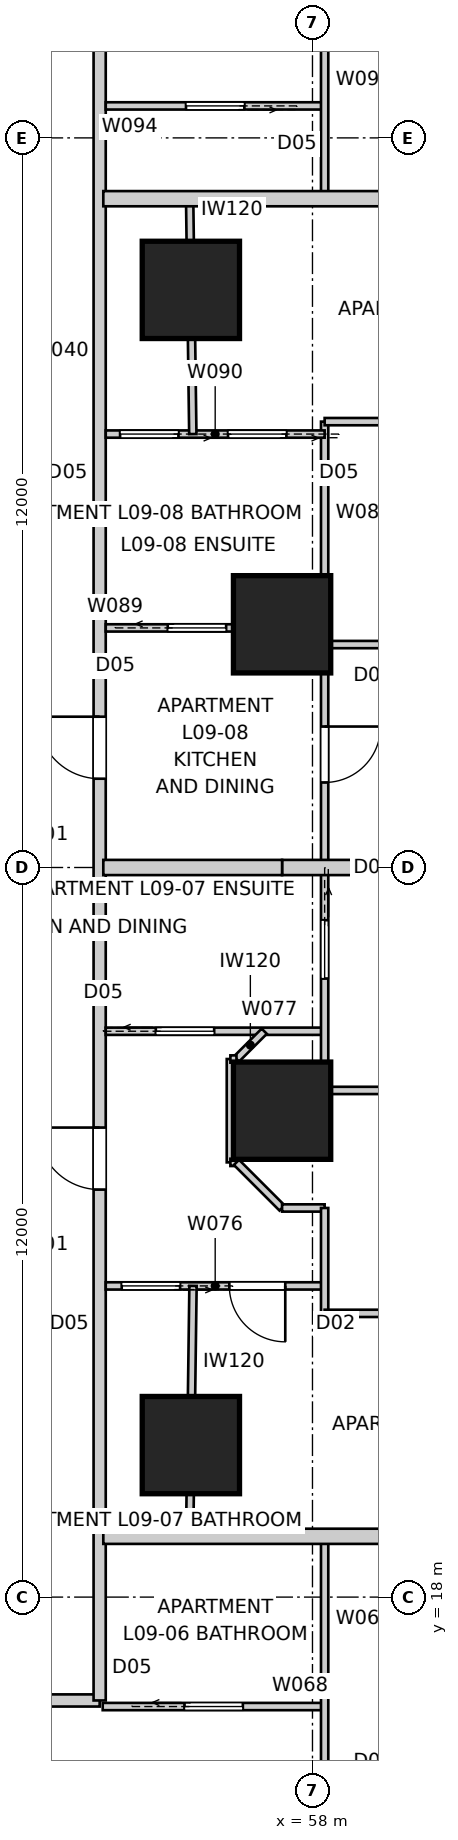
"""IFC4 building model, lengths in metres.
Left out: names, types, materials, properties, quantities, classifications, styles, units other than length and angle.
Written with IfcOpenShell. Run it as: python <this file> out.ifc"""

import sys

from ifc_helpers import new_model, si_unit, direction, frame, frame_2d, origin, origin_2d, place, context, subcontext, project, spatial, rectangle, extrude, element, fill, save


model = new_model("IFC4")
c1 = context("Model", 3, precision=1e-05, world=origin(), true_north=direction((0.0, 1.0)))
c2 = subcontext(c1, "Body", "Model", "MODEL_VIEW")
j1 = project(units=[si_unit("LENGTHUNIT", "METRE"), si_unit("PLANEANGLEUNIT", "RADIAN")], contexts=[c1])
p1 = place(None, origin())
s1 = spatial("IfcSite", under=j1, at=p1, CompositionType="ELEMENT")
p2 = place(p1, origin())
s2 = spatial("IfcBuilding", under=s1, at=p2, CompositionType="ELEMENT")
p3 = place(p2, frame((0.0, 0.0, 35.4)))
s3 = spatial("IfcBuildingStorey", under=s2, at=p3, CompositionType="ELEMENT", Elevation=35.4)
for number, where, z_axis, x_axis in (
    (1, (57.5, 26.0, 0.0), (0.0, 0.0, 1.0), (1.0, 0.0, 0.0)),
    (2, (57.5, 34.0, 0.0), (0.0, 0.0, 1.0), (1.0, 0.0, 0.0)),
    (3, (56.0, 39.5, 0.0), (0.0, 0.0, 1.0), (1.0, 0.0, 0.0)),
    (4, (56.0, 20.5, 0.0), (0.0, 0.0, 1.0), (1.0, 0.0, 0.0)),
):
    element("IfcColumn", number, at=place(p3, frame(where, z_axis=z_axis, x_axis=x_axis)), inside=s3, PredefinedType="COLUMN", context=c2, shape_type="SweptSolid", body=[
        extrude(rectangle(XDim=1.6, YDim=1.6, at=origin_2d()), origin(), (0.0, 0.0, 1.0), 3.4),
    ])
p4 = place(p3, frame((26.3, 16.3, 0.0), z_axis=(0.0, 0.0, 1.0), x_axis=(1.0, 0.0, 0.0)))
e5 = element("IfcWall", 5, at=p4, inside=s3, PredefinedType="PARTITIONING", context=c2, shape_type="SweptSolid", body=[
    extrude(rectangle(XDim=28.2, YDim=0.2, at=frame_2d((14.1, 0.0))), origin(), (0.0, 0.0, 1.0), 3.25),
])
p5 = place(p4, frame((4.738, 0.0, 0.0)))
e6 = element("IfcOpeningElement", 6, at=p5, cuts=e5, PredefinedType="OPENING", context=c2, shape_type="SweptSolid", body=[
    extrude(rectangle(XDim=1.02, YDim=2.34, at=frame_2d((0.51, 1.17))), frame((0.0, 0.11, 0.0), z_axis=(0.0, -1.0, 0.0), x_axis=(1.0, 0.0, 0.0)), (0.0, 0.0, 1.0), 0.22),
])
p6 = place(p4, frame((14.525, 0.0, 0.0)))
e7 = element("IfcOpeningElement", 7, at=p6, cuts=e5, PredefinedType="OPENING", context=c2, shape_type="SweptSolid", body=[
    extrude(rectangle(XDim=1.02, YDim=2.34, at=frame_2d((0.51, 1.17))), frame((0.0, 0.11, 0.0), z_axis=(0.0, -1.0, 0.0), x_axis=(1.0, 0.0, 0.0)), (0.0, 0.0, 1.0), 0.22),
])
p7 = place(p4, frame((22.333, 0.0, 0.0)))
e8 = element("IfcOpeningElement", 8, at=p7, cuts=e5, PredefinedType="OPENING", context=c2, shape_type="SweptSolid", body=[
    extrude(rectangle(XDim=1.02, YDim=2.34, at=frame_2d((0.51, 1.17))), frame((0.0, 0.11, 0.0), z_axis=(0.0, -1.0, 0.0), x_axis=(1.0, 0.0, 0.0)), (0.0, 0.0, 1.0), 0.22),
])
p8 = place(p4, frame((25.765, 0.0, 0.0)))
e9 = element("IfcOpeningElement", 9, at=p8, cuts=e5, PredefinedType="OPENING", context=c2, shape_type="SweptSolid", body=[
    extrude(rectangle(XDim=1.02, YDim=2.1, at=frame_2d((0.51, 1.05))), frame((0.0, 0.11, 0.0), z_axis=(0.0, -1.0, 0.0), x_axis=(1.0, 0.0, 0.0)), (0.0, 0.0, 1.0), 0.22),
])
p9 = place(p4, frame((1.015, 0.0, 0.0)))
e10 = element("IfcOpeningElement", 10, at=p9, cuts=e5, PredefinedType="OPENING", context=c2, shape_type="SweptSolid", body=[
    extrude(rectangle(XDim=1.02, YDim=2.1, at=frame_2d((0.51, 1.05))), frame((0.0, 0.11, 0.0), z_axis=(0.0, -1.0, 0.0), x_axis=(1.0, 0.0, 0.0)), (0.0, 0.0, 1.0), 0.22),
])
p10 = place(p3, frame((54.5, 16.3, 0.0), z_axis=(0.0, 0.0, 1.0), x_axis=(0.0, 1.0, 0.0)))
e11 = element("IfcWall", 11, at=p10, inside=s3, PredefinedType="PARTITIONING", context=c2, shape_type="SweptSolid", body=[
    extrude(rectangle(XDim=28.2, YDim=0.2, at=frame_2d((14.1, 0.0))), origin(), (0.0, 0.0, 1.0), 3.25),
])
p11 = place(p10, frame((8.403, 0.0, 0.0)))
e12 = element("IfcOpeningElement", 12, at=p11, cuts=e11, PredefinedType="OPENING", context=c2, shape_type="SweptSolid", body=[
    extrude(rectangle(XDim=1.02, YDim=2.34, at=frame_2d((0.51, 1.17))), frame((0.0, 0.11, 0.0), z_axis=(0.0, -1.0, 0.0), x_axis=(1.0, 0.0, 0.0)), (0.0, 0.0, 1.0), 0.22),
])
p12 = place(p10, frame((15.16, 0.0, 0.0)))
e13 = element("IfcOpeningElement", 13, at=p12, cuts=e11, PredefinedType="OPENING", context=c2, shape_type="SweptSolid", body=[
    extrude(rectangle(XDim=1.02, YDim=2.34, at=frame_2d((0.51, 1.17))), frame((0.0, 0.11, 0.0), z_axis=(0.0, -1.0, 0.0), x_axis=(1.0, 0.0, 0.0)), (0.0, 0.0, 1.0), 0.22),
])
for number, where, z_axis, x_axis in (
    (14, (66.0, 19.0, 0.0), (0.0, 0.0, 1.0), (-1.0, 0.0, 0.0)),
    (15, (66.0, 41.0, 0.0), (0.0, 0.0, 1.0), (-1.0, 0.0, 0.0)),
):
    element("IfcWall", number, at=place(p3, frame(where, z_axis=z_axis, x_axis=x_axis)), inside=s3, PredefinedType="PARTITIONING", context=c2, shape_type="SweptSolid", body=[
        extrude(rectangle(XDim=11.44, YDim=0.25, at=frame_2d((5.72, 0.0))), origin(), (0.0, 0.0, 1.0), 3.25),
    ])
p13 = place(p3, frame((66.0, 30.0, 0.0), z_axis=(0.0, 0.0, 1.0), x_axis=(-1.0, 0.0, 0.0)))
e16 = element("IfcWall", 16, at=p13, inside=s3, PredefinedType="PARTITIONING", context=c2, shape_type="SweptSolid", body=[
    extrude(rectangle(XDim=8.5, YDim=0.25, at=frame_2d((4.25, 0.0))), origin(), (0.0, 0.0, 1.0), 3.25),
])
p14 = place(p3, frame((57.5, 30.0, 0.0), z_axis=(0.0, 0.0, 1.0), x_axis=(-1.0, 0.0, 0.0)))
e17 = element("IfcWall", 17, at=p14, inside=s3, PredefinedType="PARTITIONING", context=c2, shape_type="SweptSolid", body=[
    extrude(rectangle(XDim=2.94, YDim=0.25, at=frame_2d((1.47, 0.0))), origin(), (0.0, 0.0, 1.0), 2.796),
])
p15 = place(p3, frame((54.55, 16.2, 0.0), z_axis=(0.0, 0.0, 1.0), x_axis=(1.0, 0.0, 0.0)))
e18 = element("IfcWall", 18, at=p15, inside=s3, PredefinedType="PARTITIONING", context=c2, shape_type="SweptSolid", body=[
    extrude(rectangle(XDim=3.65, YDim=0.12, at=frame_2d((1.825, 0.0))), origin(), (0.0, 0.0, 1.0), 3.25),
])
p16 = place(p15, frame((1.345, 0.0, 0.0)))
e19 = element("IfcOpeningElement", 19, at=p16, cuts=e18, PredefinedType="OPENING", context=c2, shape_type="SweptSolid", body=[
    extrude(rectangle(XDim=0.96, YDim=2.1, at=frame_2d((0.48, 1.05))), frame((0.0, 0.07, 0.0), z_axis=(0.0, -1.0, 0.0), x_axis=(1.0, 0.0, 0.0)), (0.0, 0.0, 1.0), 0.14),
])
p17 = place(p3, frame((58.2, 19.0, 0.0), z_axis=(0.0, 0.0, 1.0), x_axis=(0.0, -1.0, 0.0)))
e20 = element("IfcWall", 20, at=p17, inside=s3, PredefinedType="PARTITIONING", context=c2, shape_type="SweptSolid", body=[
    extrude(rectangle(XDim=7.2, YDim=0.12, at=frame_2d((3.6, 0.0))), origin(), (0.0, 0.0, 1.0), 3.25),
])
p18 = place(p17, frame((4.54, 0.0, 0.0)))
e21 = element("IfcOpeningElement", 21, at=p18, cuts=e20, PredefinedType="OPENING", context=c2, shape_type="SweptSolid", body=[
    extrude(rectangle(XDim=0.92, YDim=2.34, at=frame_2d((0.46, 1.17))), frame((0.0, 0.07, 0.0), z_axis=(0.0, -1.0, 0.0), x_axis=(1.0, 0.0, 0.0)), (0.0, 0.0, 1.0), 0.14),
])
p19 = place(p3, frame((58.2, 23.118, 0.0), z_axis=(0.0, 0.0, 1.0), x_axis=(-1.0, 0.0, 0.0)))
e22 = element("IfcWall", 22, at=p19, inside=s3, PredefinedType="PARTITIONING", context=c2, shape_type="SweptSolid", body=[
    extrude(rectangle(XDim=3.6, YDim=0.12, at=frame_2d((1.8, 0.0))), origin(), (0.0, 0.0, 1.0), 3.25),
])
p20 = place(p19, frame((0.647, 0.0, 0.0)))
e23 = element("IfcOpeningElement", 23, at=p20, cuts=e22, PredefinedType="OPENING", context=c2, shape_type="SweptSolid", body=[
    extrude(rectangle(XDim=0.92, YDim=2.34, at=frame_2d((0.46, 1.17))), frame((0.0, 0.07, 0.0), z_axis=(0.0, -1.0, 0.0), x_axis=(1.0, 0.0, 0.0)), (0.0, 0.0, 1.0), 0.14),
])
p21 = place(p19, frame((2.377, 0.0, 0.0)))
e24 = element("IfcOpeningElement", 24, at=p21, cuts=e22, PredefinedType="OPENING", context=c2, shape_type="SweptSolid", body=[
    extrude(rectangle(XDim=0.96, YDim=2.1, at=frame_2d((0.48, 1.05))), frame((0.0, 0.07, 0.0), z_axis=(0.0, -1.0, 0.0), x_axis=(1.0, 0.0, 0.0)), (0.0, 0.0, 1.0), 0.14),
])
p22 = place(p3, frame((54.6, 27.307, 0.0), z_axis=(0.0, 0.0, 1.0), x_axis=(1.0, 0.0, 0.0)))
e25 = element("IfcWall", 25, at=p22, inside=s3, PredefinedType="PARTITIONING", context=c2, shape_type="SweptSolid", body=[
    extrude(rectangle(XDim=3.6, YDim=0.12, at=frame_2d((1.8, 0.0))), origin(), (0.0, 0.0, 1.0), 3.25),
])
p23 = place(p22, frame((0.823, 0.0, 0.0)))
e26 = element("IfcOpeningElement", 26, at=p23, cuts=e25, PredefinedType="OPENING", context=c2, shape_type="SweptSolid", body=[
    extrude(rectangle(XDim=0.96, YDim=2.1, at=frame_2d((0.48, 1.05))), frame((0.0, 0.07, 0.0), z_axis=(0.0, -1.0, 0.0), x_axis=(1.0, 0.0, 0.0)), (0.0, 0.0, 1.0), 0.14),
])
p24 = place(p3, frame((57.207, 27.307, 0.0), z_axis=(0.0, 0.0, 1.0), x_axis=(-0.707295771362, -0.706917740485, 0.0)))
e27 = element("IfcWall", 27, at=p24, inside=s3, PredefinedType="PARTITIONING", context=c2, shape_type="SweptSolid", body=[
    extrude(rectangle(XDim=0.646, YDim=0.12, at=frame_2d((0.323, 0.0))), origin(), (0.0, 0.0, 1.0), 3.25),
])
p25 = place(p3, frame((56.65, 26.85, 0.0), z_axis=(0.0, 0.0, 1.0), x_axis=(0.0, -1.0, 0.0)))
e28 = element("IfcWall", 28, at=p25, inside=s3, PredefinedType="PARTITIONING", context=c2, shape_type="SweptSolid", body=[
    extrude(rectangle(XDim=1.7, YDim=0.12, at=frame_2d((0.85, 0.0))), origin(), (0.0, 0.0, 1.0), 3.25),
])
p26 = place(p3, frame((56.75, 25.15, 0.0), z_axis=(0.0, 0.0, 1.0), x_axis=(0.707106781187, -0.707106781187, 0.0)))
e29 = element("IfcWall", 29, at=p26, inside=s3, PredefinedType="PARTITIONING", context=c2, shape_type="SweptSolid", body=[
    extrude(rectangle(XDim=1.061, YDim=0.12, at=frame_2d((0.53, 0.0))), origin(), (0.0, 0.0, 1.0), 3.25),
])
p27 = place(p3, frame((57.5, 24.4, 0.0), z_axis=(0.0, 0.0, 1.0), x_axis=(1.0, 0.0, 0.0)))
e30 = element("IfcWall", 30, at=p27, inside=s3, PredefinedType="PARTITIONING", context=c2, shape_type="SweptSolid", body=[
    extrude(rectangle(XDim=0.7, YDim=0.12, at=frame_2d((0.35, 0.0))), origin(), (0.0, 0.0, 1.0), 3.25),
])
p28 = place(p3, frame((58.2, 24.4, 0.0), z_axis=(0.0, 0.0, 1.0), x_axis=(0.0, -1.0, 0.0)))
e31 = element("IfcWall", 31, at=p28, inside=s3, PredefinedType="PARTITIONING", context=c2, shape_type="SweptSolid", body=[
    extrude(rectangle(XDim=1.733, YDim=0.12, at=frame_2d((0.867, 0.0))), origin(), (0.0, 0.0, 1.0), 3.25),
])
p29 = place(p3, frame((56.035, 23.118, 0.0), z_axis=(0.0, 0.0, 1.0), x_axis=(-0.013455418228, -0.999909471762, 0.0)))
e32 = element("IfcWall", 32, at=p29, inside=s3, PredefinedType="PARTITIONING", context=c2, shape_type="SweptSolid", body=[
    extrude(rectangle(XDim=4.119, YDim=0.12, at=frame_2d((2.06, 0.0))), origin(), (0.0, 0.0, 1.0), 2.549),
])
p30 = place(p3, frame((58.2, 37.333, 0.0), z_axis=(0.0, 0.0, 1.0), x_axis=(0.0, -1.0, 0.0)))
e33 = element("IfcWall", 33, at=p30, inside=s3, PredefinedType="PARTITIONING", context=c2, shape_type="SweptSolid", body=[
    extrude(rectangle(XDim=11.0, YDim=0.12, at=frame_2d((5.5, 0.0))), origin(), (0.0, 0.0, 1.0), 3.25),
])
p31 = place(p30, frame((5.015, 0.0, 0.0)))
e34 = element("IfcOpeningElement", 34, at=p31, cuts=e33, PredefinedType="OPENING", context=c2, shape_type="SweptSolid", body=[
    extrude(rectangle(XDim=0.92, YDim=2.34, at=frame_2d((0.46, 1.17))), frame((0.0, 0.07, 0.0), z_axis=(0.0, -1.0, 0.0), x_axis=(1.0, 0.0, 0.0)), (0.0, 0.0, 1.0), 0.14),
])
p32 = place(p30, frame((8.2, 0.0, 0.0)))
e35 = element("IfcOpeningElement", 35, at=p32, cuts=e33, PredefinedType="OPENING", context=c2, shape_type="SweptSolid", body=[
    extrude(rectangle(XDim=0.96, YDim=2.1, at=frame_2d((0.48, 1.05))), frame((0.0, 0.07, 0.0), z_axis=(0.0, -1.0, 0.0), x_axis=(1.0, 0.0, 0.0)), (0.0, 0.0, 1.0), 0.14),
])
p33 = place(p3, frame((58.2, 22.667, 0.0), z_axis=(0.0, 0.0, 1.0), x_axis=(1.0, 0.0, 0.0)))
e36 = element("IfcWall", 36, at=p33, inside=s3, PredefinedType="PARTITIONING", context=c2, shape_type="SweptSolid", body=[
    extrude(rectangle(XDim=7.76, YDim=0.12, at=frame_2d((3.88, 0.0))), origin(), (0.0, 0.0, 1.0), 3.25),
])
p34 = place(p33, frame((3.44, 0.0, 0.0)))
e37 = element("IfcOpeningElement", 37, at=p34, cuts=e36, PredefinedType="OPENING", context=c2, shape_type="SweptSolid", body=[
    extrude(rectangle(XDim=0.92, YDim=2.34, at=frame_2d((0.46, 1.17))), frame((0.0, 0.07, 0.0), z_axis=(0.0, -1.0, 0.0), x_axis=(1.0, 0.0, 0.0)), (0.0, 0.0, 1.0), 0.14),
])
p35 = place(p3, frame((65.96, 26.333, 0.0), z_axis=(0.0, 0.0, 1.0), x_axis=(-1.0, 0.0, 0.0)))
e38 = element("IfcWall", 38, at=p35, inside=s3, PredefinedType="PARTITIONING", context=c2, shape_type="SweptSolid", body=[
    extrude(rectangle(XDim=7.76, YDim=0.12, at=frame_2d((3.88, 0.0))), origin(), (0.0, 0.0, 1.0), 3.25),
])
p36 = place(p3, frame((54.6, 33.94, 0.0), z_axis=(0.0, 0.0, 1.0), x_axis=(1.0, 0.0, 0.0)))
e39 = element("IfcWall", 39, at=p36, inside=s3, PredefinedType="PARTITIONING", context=c2, shape_type="SweptSolid", body=[
    extrude(rectangle(XDim=3.6, YDim=0.12, at=frame_2d((1.8, 0.0))), origin(), (0.0, 0.0, 1.0), 3.25),
])
p37 = place(p36, frame((1.02, 0.0, 0.0)))
e40 = element("IfcOpeningElement", 40, at=p37, cuts=e39, PredefinedType="OPENING", context=c2, shape_type="SweptSolid", body=[
    extrude(rectangle(XDim=0.96, YDim=2.1, at=frame_2d((0.48, 1.05))), frame((0.0, 0.07, 0.0), z_axis=(0.0, -1.0, 0.0), x_axis=(1.0, 0.0, 0.0)), (0.0, 0.0, 1.0), 0.14),
])
p38 = place(p3, frame((58.2, 37.129, 0.0), z_axis=(0.0, 0.0, 1.0), x_axis=(-1.0, 0.0, 0.0)))
e41 = element("IfcWall", 41, at=p38, inside=s3, PredefinedType="PARTITIONING", context=c2, shape_type="SweptSolid", body=[
    extrude(rectangle(XDim=3.6, YDim=0.12, at=frame_2d((1.8, 0.0))), origin(), (0.0, 0.0, 1.0), 3.25),
])
p39 = place(p38, frame((0.629, 0.0, 0.0)))
e42 = element("IfcOpeningElement", 42, at=p39, cuts=e41, PredefinedType="OPENING", context=c2, shape_type="SweptSolid", body=[
    extrude(rectangle(XDim=0.96, YDim=2.1, at=frame_2d((0.48, 1.05))), frame((0.0, 0.07, 0.0), z_axis=(0.0, -1.0, 0.0), x_axis=(1.0, 0.0, 0.0)), (0.0, 0.0, 1.0), 0.14),
])
p40 = place(p38, frame((2.404, 0.0, 0.0)))
e43 = element("IfcOpeningElement", 43, at=p40, cuts=e41, PredefinedType="OPENING", context=c2, shape_type="SweptSolid", body=[
    extrude(rectangle(XDim=0.96, YDim=2.1, at=frame_2d((0.48, 1.05))), frame((0.0, 0.07, 0.0), z_axis=(0.0, -1.0, 0.0), x_axis=(1.0, 0.0, 0.0)), (0.0, 0.0, 1.0), 0.14),
])
p41 = place(p3, frame((55.98, 41.0, 0.0), z_axis=(0.0, 0.0, 1.0), x_axis=(0.013494388256, -0.999908946597, 0.0)))
e44 = element("IfcWall", 44, at=p41, inside=s3, PredefinedType="PARTITIONING", context=c2, shape_type="SweptSolid", body=[
    extrude(rectangle(XDim=3.872, YDim=0.12, at=frame_2d((1.936, 0.0))), origin(), (0.0, 0.0, 1.0), 2.549),
])
p42 = place(p3, frame((58.2, 33.667, 0.0), z_axis=(0.0, 0.0, 1.0), x_axis=(1.0, 0.0, 0.0)))
e45 = element("IfcWall", 45, at=p42, inside=s3, PredefinedType="PARTITIONING", context=c2, shape_type="SweptSolid", body=[
    extrude(rectangle(XDim=7.76, YDim=0.12, at=frame_2d((3.88, 0.0))), origin(), (0.0, 0.0, 1.0), 3.25),
])
p43 = place(p42, frame((3.44, 0.0, 0.0)))
e46 = element("IfcOpeningElement", 46, at=p43, cuts=e45, PredefinedType="OPENING", context=c2, shape_type="SweptSolid", body=[
    extrude(rectangle(XDim=0.92, YDim=2.34, at=frame_2d((0.46, 1.17))), frame((0.0, 0.07, 0.0), z_axis=(0.0, -1.0, 0.0), x_axis=(1.0, 0.0, 0.0)), (0.0, 0.0, 1.0), 0.14),
])
p44 = place(p3, frame((65.96, 37.333, 0.0), z_axis=(0.0, 0.0, 1.0), x_axis=(-1.0, 0.0, 0.0)))
e47 = element("IfcWall", 47, at=p44, inside=s3, PredefinedType="PARTITIONING", context=c2, shape_type="SweptSolid", body=[
    extrude(rectangle(XDim=7.76, YDim=0.12, at=frame_2d((3.88, 0.0))), origin(), (0.0, 0.0, 1.0), 3.25),
])
p45 = place(p3, frame((58.2, 42.526, 0.0), z_axis=(0.0, 0.0, 1.0), x_axis=(-1.0, 0.0, 0.0)))
e48 = element("IfcWall", 48, at=p45, inside=s3, PredefinedType="PARTITIONING", context=c2, shape_type="SweptSolid", body=[
    extrude(rectangle(XDim=3.6, YDim=0.12, at=frame_2d((1.8, 0.0))), origin(), (0.0, 0.0, 1.0), 3.25),
])
p46 = place(p45, frame((1.32, 0.0, 0.0)))
e49 = element("IfcOpeningElement", 49, at=p46, cuts=e48, PredefinedType="OPENING", context=c2, shape_type="SweptSolid", body=[
    extrude(rectangle(XDim=0.96, YDim=2.1, at=frame_2d((0.48, 1.05))), frame((0.0, 0.07, 0.0), z_axis=(0.0, -1.0, 0.0), x_axis=(1.0, 0.0, 0.0)), (0.0, 0.0, 1.0), 0.14),
])
p47 = place(p3, frame((58.2, 48.2, 0.0), z_axis=(0.0, 0.0, 1.0), x_axis=(0.0, -1.0, 0.0)))
e50 = element("IfcWall", 50, at=p47, inside=s3, PredefinedType="PARTITIONING", context=c2, shape_type="SweptSolid", body=[
    extrude(rectangle(XDim=7.2, YDim=0.12, at=frame_2d((3.6, 0.0))), origin(), (0.0, 0.0, 1.0), 3.25),
])
p48 = place(p47, frame((2.377, 0.0, 0.0)))
e51 = element("IfcOpeningElement", 51, at=p48, cuts=e50, PredefinedType="OPENING", context=c2, shape_type="SweptSolid", body=[
    extrude(rectangle(XDim=0.92, YDim=2.34, at=frame_2d((0.46, 1.17))), frame((0.0, 0.07, 0.0), z_axis=(0.0, -1.0, 0.0), x_axis=(1.0, 0.0, 0.0)), (0.0, 0.0, 1.0), 0.14),
])
for number, where, z_axis, x_axis in (
    (52, (56.65, 26.85, 0.0), (0.0, 0.0, 1.0), (1.0, 0.0, 0.0)),
    (53, (56.65, 25.15, 0.0), (0.0, 0.0, 1.0), (1.0, 0.0, 0.0)),
):
    element("IfcWall", number, at=place(p3, frame(where, z_axis=z_axis, x_axis=x_axis)), inside=s3, PredefinedType="PARTITIONING", context=c2, shape_type="SweptSolid", body=[
        extrude(rectangle(XDim=0.1, YDim=0.12, at=frame_2d((0.05, 0.0))), origin(), (0.0, 0.0, 1.0), 3.25),
    ])
p49 = place(p11, origin())
e54 = element("IfcDoor", 54, at=p49, inside=s3, OperationType="SINGLE_SWING_RIGHT", PredefinedType="DOOR", context=c2, shape_type="SweptSolid", body=[
    extrude(rectangle(XDim=1.02, YDim=2.34, at=frame_2d((0.51, 1.17))), frame((0.0, 0.025, 0.0), z_axis=(0.0, -1.0, 0.0), x_axis=(1.0, 0.0, 0.0)), (0.0, 0.0, 1.0), 0.05),
])
fill(e12, e54)
p50 = place(p12, origin())
e55 = element("IfcDoor", 55, at=p50, inside=s3, OperationType="SINGLE_SWING_RIGHT", PredefinedType="DOOR", context=c2, shape_type="SweptSolid", body=[
    extrude(rectangle(XDim=1.02, YDim=2.34, at=frame_2d((0.51, 1.17))), frame((0.0, 0.025, 0.0), z_axis=(0.0, -1.0, 0.0), x_axis=(1.0, 0.0, 0.0)), (0.0, 0.0, 1.0), 0.05),
])
fill(e13, e55)
p51 = place(p23, origin())
e56 = element("IfcDoor", 56, at=p51, inside=s3, OperationType="SLIDING_TO_LEFT", PredefinedType="DOOR", context=c2, shape_type="SweptSolid", body=[
    extrude(rectangle(XDim=0.96, YDim=2.1, at=frame_2d((0.48, 1.05))), frame((0.0, 0.025, 0.0), z_axis=(0.0, -1.0, 0.0), x_axis=(1.0, 0.0, 0.0)), (0.0, 0.0, 1.0), 0.05),
])
fill(e26, e56)
p52 = place(p20, origin())
e57 = element("IfcDoor", 57, at=p52, inside=s3, OperationType="SINGLE_SWING_LEFT", PredefinedType="DOOR", context=c2, shape_type="SweptSolid", body=[
    extrude(rectangle(XDim=0.92, YDim=2.34, at=frame_2d((0.46, 1.17))), frame((0.0, 0.025, 0.0), z_axis=(0.0, -1.0, 0.0), x_axis=(1.0, 0.0, 0.0)), (0.0, 0.0, 1.0), 0.05),
])
fill(e23, e57)
p53 = place(p21, origin())
e58 = element("IfcDoor", 58, at=p53, inside=s3, OperationType="SLIDING_TO_LEFT", PredefinedType="DOOR", context=c2, shape_type="SweptSolid", body=[
    extrude(rectangle(XDim=0.96, YDim=2.1, at=frame_2d((0.48, 1.05))), frame((0.0, 0.025, 0.0), z_axis=(0.0, -1.0, 0.0), x_axis=(1.0, 0.0, 0.0)), (0.0, 0.0, 1.0), 0.05),
])
fill(e24, e58)
p54 = place(p31, origin())
e59 = element("IfcDoor", 59, at=p54, inside=s3, OperationType="SINGLE_SWING_LEFT", PredefinedType="DOOR", context=c2, shape_type="SweptSolid", body=[
    extrude(rectangle(XDim=0.92, YDim=2.34, at=frame_2d((0.46, 1.17))), frame((0.0, 0.025, 0.0), z_axis=(0.0, -1.0, 0.0), x_axis=(1.0, 0.0, 0.0)), (0.0, 0.0, 1.0), 0.05),
])
fill(e34, e59)
p55 = place(p37, origin())
e60 = element("IfcDoor", 60, at=p55, inside=s3, OperationType="SLIDING_TO_LEFT", PredefinedType="DOOR", context=c2, shape_type="SweptSolid", body=[
    extrude(rectangle(XDim=0.96, YDim=2.1, at=frame_2d((0.48, 1.05))), frame((0.0, 0.025, 0.0), z_axis=(0.0, -1.0, 0.0), x_axis=(1.0, 0.0, 0.0)), (0.0, 0.0, 1.0), 0.05),
])
fill(e40, e60)
p56 = place(p16, origin())
e61 = element("IfcDoor", 61, at=p56, inside=s3, OperationType="SLIDING_TO_LEFT", PredefinedType="DOOR", context=c2, shape_type="SweptSolid", body=[
    extrude(rectangle(XDim=0.96, YDim=2.1, at=frame_2d((0.48, 1.05))), frame((0.0, 0.025, 0.0), z_axis=(0.0, -1.0, 0.0), x_axis=(1.0, 0.0, 0.0)), (0.0, 0.0, 1.0), 0.05),
])
fill(e19, e61)
p57 = place(p46, origin())
e62 = element("IfcDoor", 62, at=p57, inside=s3, OperationType="SLIDING_TO_LEFT", PredefinedType="DOOR", context=c2, shape_type="SweptSolid", body=[
    extrude(rectangle(XDim=0.96, YDim=2.1, at=frame_2d((0.48, 1.05))), frame((0.0, 0.025, 0.0), z_axis=(0.0, -1.0, 0.0), x_axis=(1.0, 0.0, 0.0)), (0.0, 0.0, 1.0), 0.05),
])
fill(e49, e62)
p58 = place(p32, origin())
e63 = element("IfcDoor", 63, at=p58, inside=s3, OperationType="SLIDING_TO_LEFT", PredefinedType="DOOR", context=c2, shape_type="SweptSolid", body=[
    extrude(rectangle(XDim=0.96, YDim=2.1, at=frame_2d((0.48, 1.05))), frame((0.0, 0.025, 0.0), z_axis=(0.0, -1.0, 0.0), x_axis=(1.0, 0.0, 0.0)), (0.0, 0.0, 1.0), 0.05),
])
fill(e35, e63)
p59 = place(p39, origin())
e64 = element("IfcDoor", 64, at=p59, inside=s3, OperationType="SLIDING_TO_LEFT", PredefinedType="DOOR", context=c2, shape_type="SweptSolid", body=[
    extrude(rectangle(XDim=0.96, YDim=2.1, at=frame_2d((0.48, 1.05))), frame((0.0, 0.025, 0.0), z_axis=(0.0, -1.0, 0.0), x_axis=(1.0, 0.0, 0.0)), (0.0, 0.0, 1.0), 0.05),
])
fill(e42, e64)
p60 = place(p40, origin())
e65 = element("IfcDoor", 65, at=p60, inside=s3, OperationType="SLIDING_TO_LEFT", PredefinedType="DOOR", context=c2, shape_type="SweptSolid", body=[
    extrude(rectangle(XDim=0.96, YDim=2.1, at=frame_2d((0.48, 1.05))), frame((0.0, 0.025, 0.0), z_axis=(0.0, -1.0, 0.0), x_axis=(1.0, 0.0, 0.0)), (0.0, 0.0, 1.0), 0.05),
])
fill(e43, e65)
save(model, sys.argv[1])
